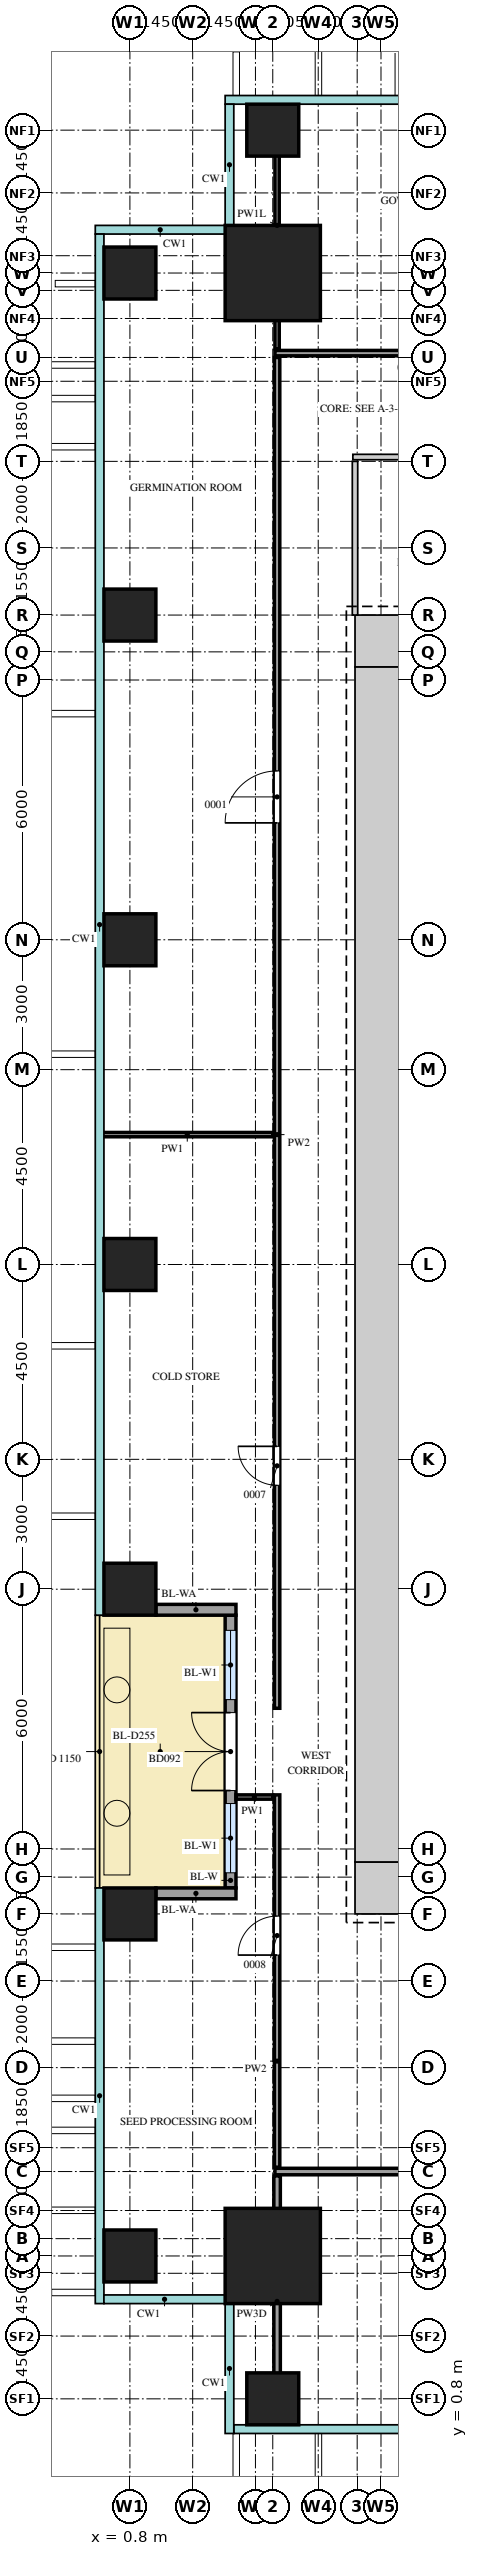
"""IFC4 building model, lengths in metres.
Left out: names, types, materials, properties, quantities, classifications, styles, units other than length and angle.
Written with IfcOpenShell. Run it as: python <this file> out.ifc"""

import sys

from ifc_helpers import new_model, si_unit, direction, frame, frame_2d, origin, origin_2d, place, context, subcontext, project, spatial, rectangle, extrude, source, transform, mapped, element, fill, save


model = new_model("IFC4")
c1 = context("Model", 3, precision=1e-05, world=origin(), true_north=direction((0.0, 1.0)))
c2 = subcontext(c1, "Body", "Model", "MODEL_VIEW")
j1 = project(units=[si_unit("LENGTHUNIT", "METRE"), si_unit("PLANEANGLEUNIT", "RADIAN")], contexts=[c1])
p1 = place(None, origin())
s1 = spatial("IfcSite", under=j1, at=p1, CompositionType="ELEMENT")
p2 = place(p1, origin())
s2 = spatial("IfcBuilding", under=s1, at=p2, CompositionType="ELEMENT")
p3 = place(p2, frame((0.0, 0.0, 46.5)))
s3 = spatial("IfcBuildingStorey", under=s2, at=p3, CompositionType="ELEMENT", Elevation=46.5)
m1 = source(origin(), c2, "Body", "SweptSolid", [
    extrude(rectangle(XDim=1.2, YDim=1.2, at=frame_2d((0.6, 0.0))), origin(), (0.0, 0.0, 1.0), 4.2),
])
for number, where, z_axis, x_axis in (
    (1, (6.0, 41.4, 0.0), (0.0, 0.0, 1.0), (1.0, 0.0, 0.0)),
    (2, (6.0, 12.6, 0.0), (0.0, 0.0, 1.0), (1.0, 0.0, 0.0)),
):
    element("IfcWall", number, at=place(p3, frame(where, z_axis=z_axis, x_axis=x_axis)), inside=s3, PredefinedType="SHEAR", context=c2, shape_type="MappedRepresentation", body=[
        mapped(m1, transform((0.0, 0.0, 0.0))),
    ])
m2 = source(origin(), c2, "Body", "SweptSolid", [
    extrude(rectangle(XDim=27.6, YDim=1.2, at=frame_2d((13.8, 0.0))), origin(), (0.0, 0.0, 1.0), 4.2),
])
p4 = place(p3, frame((6.6, 13.2, 0.0), z_axis=(0.0, 0.0, 1.0), x_axis=(0.0, 1.0, 0.0)))
e3 = element("IfcWall", 3, at=p4, inside=s3, PredefinedType="SHEAR", context=c2, shape_type="MappedRepresentation", body=[
    mapped(m2, transform((0.0, 0.0, 0.0))),
])
m3 = source(origin(), c2, "Body", "SweptSolid", [
    extrude(rectangle(XDim=2.2, YDim=2.2, at=origin_2d()), origin(), (0.0, 0.0, 1.0), 4.5),
])
for number, where, z_axis, x_axis in (
    (4, (4.1, 49.9, 0.0), (0.0, 0.0, 1.0), (1.0, 0.0, 0.0)),
    (5, (4.1, 4.1, 0.0), (0.0, 0.0, 1.0), (1.0, 0.0, 0.0)),
):
    element("IfcColumn", number, at=place(p3, frame(where, z_axis=z_axis, x_axis=x_axis)), inside=s3, PredefinedType="COLUMN", context=c2, shape_type="MappedRepresentation", body=[
        mapped(m3, transform((0.0, 0.0, 0.0))),
    ])
m4 = source(origin(), c2, "Body", "SweptSolid", [
    extrude(rectangle(XDim=1.2, YDim=1.2, at=origin_2d()), origin(), (0.0, 0.0, 1.0), 4.2),
])
for number, where, z_axis, x_axis in (
    (6, (4.1, 0.8, 0.0), (0.0, 0.0, 1.0), (1.0, 0.0, 0.0)),
    (7, (4.1, 53.2, 0.0), (0.0, 0.0, 1.0), (1.0, 0.0, 0.0)),
    (8, (0.8, 4.1, 0.0), (0.0, 0.0, 1.0), (1.0, 0.0, 0.0)),
    (9, (0.8, 12.0, 0.0), (0.0, 0.0, 1.0), (1.0, 0.0, 0.0)),
    (10, (0.8, 19.5, 0.0), (0.0, 0.0, 1.0), (1.0, 0.0, 0.0)),
    (11, (0.8, 27.0, 0.0), (0.0, 0.0, 1.0), (1.0, 0.0, 0.0)),
    (12, (0.8, 34.5, 0.0), (0.0, 0.0, 1.0), (1.0, 0.0, 0.0)),
    (13, (0.8, 42.0, 0.0), (0.0, 0.0, 1.0), (1.0, 0.0, 0.0)),
    (14, (0.8, 49.9, 0.0), (0.0, 0.0, 1.0), (1.0, 0.0, 0.0)),
):
    element("IfcColumn", number, at=place(p3, frame(where, z_axis=z_axis, x_axis=x_axis)), inside=s3, PredefinedType="COLUMN", context=c2, shape_type="MappedRepresentation", body=[
        mapped(m4, transform((0.0, 0.0, 0.0))),
    ])
m5 = source(origin(), c2, "Body", "SweptSolid", [
    extrude(rectangle(XDim=6.3, YDim=0.25, at=frame_2d((3.15, 0.0))), origin(), (0.0, 0.0, 1.0), 4.2),
])
p5 = place(p3, frame((3.125, 12.6, 0.0), z_axis=(0.0, 0.0, 1.0), x_axis=(0.0, 1.0, 0.0)))
e15 = element("IfcWall", 15, at=p5, inside=s3, PredefinedType="SOLIDWALL", context=c2, shape_type="MappedRepresentation", body=[
    mapped(m5, transform((0.0, 0.0, 0.0))),
])
m6 = source(origin(), c2, "Body", "SweptSolid", [
    extrude(rectangle(XDim=1.6, YDim=2.4, at=frame_2d((0.8, 1.2))), frame((0.0, 0.135, 0.0), z_axis=(0.0, -1.0, 0.0), x_axis=(1.0, 0.0, 0.0)), (0.0, 0.0, 1.0), 0.27),
])
p6 = place(p5, frame((0.35, 0.0, 0.0)))
e16 = element("IfcOpeningElement", 16, at=p6, cuts=e15, PredefinedType="OPENING", context=c2, shape_type="MappedRepresentation", body=[
    mapped(m6, transform((0.0, 0.0, 0.0))),
])
p7 = place(p5, frame((4.35, 0.0, 0.0)))
e17 = element("IfcOpeningElement", 17, at=p7, cuts=e15, PredefinedType="OPENING", context=c2, shape_type="MappedRepresentation", body=[
    mapped(m6, transform((0.0, 0.0, 0.0))),
])
m7 = source(origin(), c2, "Body", "SweptSolid", [
    extrude(rectangle(XDim=1.8, YDim=2.4, at=frame_2d((0.9, 1.2))), frame((0.0, 0.135, 0.0), z_axis=(0.0, -1.0, 0.0), x_axis=(1.0, 0.0, 0.0)), (0.0, 0.0, 1.0), 0.27),
])
p8 = place(p5, frame((2.25, 0.0, 0.0)))
e18 = element("IfcOpeningElement", 18, at=p8, cuts=e15, PredefinedType="OPENING", context=c2, shape_type="MappedRepresentation", body=[
    mapped(m7, transform((0.0, 0.0, 0.0))),
])
m8 = source(origin(), c2, "Body", "SweptSolid", [
    extrude(rectangle(XDim=1.85, YDim=0.25, at=frame_2d((0.925, 0.0))), origin(), (0.0, 0.0, 1.0), 3.9),
])
for number, where, z_axis, x_axis in (
    (19, (1.4, 12.475, 0.0), (0.0, 0.0, 1.0), (1.0, 0.0, 0.0)),
    (20, (1.4, 19.025, 0.0), (0.0, 0.0, 1.0), (1.0, 0.0, 0.0)),
):
    element("IfcWall", number, at=place(p3, frame(where, z_axis=z_axis, x_axis=x_axis)), inside=s3, PredefinedType="SOLIDWALL", context=c2, shape_type="MappedRepresentation", body=[
        mapped(m8, transform((0.0, 0.0, 0.0))),
    ])
m9 = source(origin(), c2, "Body", "SweptSolid", [
    extrude(rectangle(XDim=5.8, YDim=0.15, at=frame_2d((2.9, 0.0))), origin(), (0.0, 0.0, 1.0), 3.6),
])
p9 = place(p3, frame((4.2, 0.15, 0.0), z_axis=(0.0, 0.0, 1.0), x_axis=(0.0, 1.0, 0.0)))
e21 = element("IfcWall", 21, at=p9, inside=s3, PredefinedType="PARTITIONING", context=c2, shape_type="MappedRepresentation", body=[
    mapped(m9, transform((0.0, 0.0, 0.0))),
])
m10 = source(origin(), c2, "Body", "SweptSolid", [
    extrude(rectangle(XDim=22.15, YDim=0.15, at=frame_2d((11.075, 0.0))), origin(), (0.0, 0.0, 1.0), 4.3),
])
p10 = place(p3, frame((4.15, 6.05, 0.0), z_axis=(0.0, 0.0, 1.0), x_axis=(1.0, 0.0, 0.0)))
e22 = element("IfcWall", 22, at=p10, inside=s3, PredefinedType="PARTITIONING", context=c2, shape_type="MappedRepresentation", body=[
    mapped(m10, transform((0.0, 0.0, 0.0))),
])
m11 = source(origin(), c2, "Body", "SweptSolid", [
    extrude(rectangle(XDim=1.2, YDim=2.1, at=frame_2d((0.6, 1.05))), frame((0.0, 0.085, 0.0), z_axis=(0.0, -1.0, 0.0), x_axis=(1.0, 0.0, 0.0)), (0.0, 0.0, 1.0), 0.17),
])
p11 = place(p10, frame((9.2, 0.0, 0.0)))
e23 = element("IfcOpeningElement", 23, at=p11, cuts=e22, PredefinedType="OPENING", context=c2, shape_type="MappedRepresentation", body=[
    mapped(m11, transform((0.0, 0.0, 0.0))),
])
m12 = source(origin(), c2, "Body", "SweptSolid", [
    extrude(rectangle(XDim=0.85, YDim=0.1, at=frame_2d((0.425, 0.0))), origin(), (0.0, 0.0, 1.0), 4.3),
])
p12 = place(p3, frame((3.25, 14.7, 0.0), z_axis=(0.0, 0.0, 1.0), x_axis=(1.0, 0.0, 0.0)))
e24 = element("IfcWall", 24, at=p12, inside=s3, PredefinedType="PARTITIONING", context=c2, shape_type="MappedRepresentation", body=[
    mapped(m12, transform((0.0, 0.0, 0.0))),
])
m13 = source(origin(), c2, "Body", "SweptSolid", [
    extrude(rectangle(XDim=3.95, YDim=0.1, at=frame_2d((1.975, 0.0))), origin(), (0.0, 0.0, 1.0), 4.3),
])
p13 = place(p3, frame((0.15, 30.0, 0.0), z_axis=(0.0, 0.0, 1.0), x_axis=(1.0, 0.0, 0.0)))
e25 = element("IfcWall", 25, at=p13, inside=s3, PredefinedType="PARTITIONING", context=c2, shape_type="MappedRepresentation", body=[
    mapped(m13, transform((0.0, 0.0, 0.0))),
])
m14 = source(origin(), c2, "Body", "SweptSolid", [
    extrude(rectangle(XDim=3.55, YDim=0.125, at=frame_2d((1.775, 0.0))), origin(), (0.0, 0.0, 1.0), 4.3),
])
p14 = place(p3, frame((6.0, 42.0, 0.0), z_axis=(0.0, 0.0, 1.0), x_axis=(0.0, 1.0, 0.0)))
e26 = element("IfcWall", 26, at=p14, inside=s3, PredefinedType="PARTITIONING", context=c2, shape_type="MappedRepresentation", body=[
    mapped(m14, transform((0.0, 0.0, 0.0))),
])
m15 = source(origin(), c2, "Body", "SweptSolid", [
    extrude(rectangle(XDim=7.95, YDim=0.125, at=frame_2d((3.975, 0.0))), origin(), (0.0, 0.0, 1.0), 4.3),
])
p15 = place(p3, frame((5.95, 45.65, 0.0), z_axis=(0.0, 0.0, 1.0), x_axis=(1.0, 0.0, 0.0)))
e27 = element("IfcWall", 27, at=p15, inside=s3, PredefinedType="PARTITIONING", context=c2, shape_type="MappedRepresentation", body=[
    mapped(m15, transform((0.0, 0.0, 0.0))),
])
m16 = source(origin(), c2, "Body", "SweptSolid", [
    extrude(rectangle(XDim=0.9, YDim=2.1, at=frame_2d((0.45, 1.05))), frame((0.0, 0.073, 0.0), z_axis=(0.0, -1.0, 0.0), x_axis=(1.0, 0.0, 0.0)), (0.0, 0.0, 1.0), 0.145),
])
p16 = place(p15, frame((1.55, 0.0, 0.0)))
e28 = element("IfcOpeningElement", 28, at=p16, cuts=e27, PredefinedType="OPENING", context=c2, shape_type="MappedRepresentation", body=[
    mapped(m16, transform((0.0, 0.0, 0.0))),
])
p17 = place(p15, frame((5.65, 0.0, 0.0)))
e29 = element("IfcOpeningElement", 29, at=p17, cuts=e27, PredefinedType="OPENING", context=c2, shape_type="MappedRepresentation", body=[
    mapped(m16, transform((0.0, 0.0, 0.0))),
])
m17 = source(origin(), c2, "Body", "SweptSolid", [
    extrude(rectangle(XDim=26.6, YDim=0.125, at=frame_2d((13.3, 0.0))), origin(), (0.0, 0.0, 1.0), 4.3),
])
p18 = place(p3, frame((4.15, 48.05, 0.0), z_axis=(0.0, 0.0, 1.0), x_axis=(1.0, 0.0, 0.0)))
e30 = element("IfcWall", 30, at=p18, inside=s3, PredefinedType="PARTITIONING", context=c2, shape_type="MappedRepresentation", body=[
    mapped(m17, transform((0.0, 0.0, 0.0))),
])
p19 = place(p18, frame((3.5, 0.0, 0.0)))
e31 = element("IfcOpeningElement", 31, at=p19, cuts=e30, PredefinedType="OPENING", context=c2, shape_type="MappedRepresentation", body=[
    mapped(m16, transform((0.0, 0.0, 0.0))),
])
m18 = source(origin(), c2, "Body", "SweptSolid", [
    extrude(rectangle(XDim=1.2, YDim=2.1, at=frame_2d((0.6, 1.05))), frame((0.0, 0.073, 0.0), z_axis=(0.0, -1.0, 0.0), x_axis=(1.0, 0.0, 0.0)), (0.0, 0.0, 1.0), 0.145),
])
p20 = place(p18, frame((16.6, 0.0, 0.0)))
e32 = element("IfcOpeningElement", 32, at=p20, cuts=e30, PredefinedType="OPENING", context=c2, shape_type="MappedRepresentation", body=[
    mapped(m18, transform((0.0, 0.0, 0.0))),
])
m19 = source(origin(), c2, "Body", "SweptSolid", [
    extrude(rectangle(XDim=5.7, YDim=0.1, at=frame_2d((2.85, 0.0))), origin(), (0.0, 0.0, 1.0), 3.6),
])
p21 = place(p3, frame((4.2, 48.15, 0.0), z_axis=(0.0, 0.0, 1.0), x_axis=(0.0, 1.0, 0.0)))
e33 = element("IfcWall", 33, at=p21, inside=s3, PredefinedType="PARTITIONING", context=c2, shape_type="MappedRepresentation", body=[
    mapped(m19, transform((0.0, 0.0, 0.0))),
])
m20 = source(origin(), c2, "Body", "SweptSolid", [
    extrude(rectangle(XDim=8.6, YDim=0.125, at=frame_2d((4.3, 0.0))), origin(), (0.0, 0.0, 1.0), 4.3),
])
p22 = place(p3, frame((4.2, 6.15, 0.0), z_axis=(0.0, 0.0, 1.0), x_axis=(0.0, 1.0, 0.0)))
e34 = element("IfcWall", 34, at=p22, inside=s3, PredefinedType="PARTITIONING", context=c2, shape_type="MappedRepresentation", body=[
    mapped(m20, transform((0.0, 0.0, 0.0))),
])
p23 = place(p22, frame((4.9, 0.0, 0.0)))
e35 = element("IfcOpeningElement", 35, at=p23, cuts=e34, PredefinedType="OPENING", context=c2, shape_type="MappedRepresentation", body=[
    mapped(m16, transform((0.0, 0.0, 0.0))),
])
m21 = source(origin(), c2, "Body", "SweptSolid", [
    extrude(rectangle(XDim=31.2, YDim=0.125, at=frame_2d((15.6, 0.0))), origin(), (0.0, 0.0, 1.0), 4.3),
])
p24 = place(p3, frame((4.2, 16.75, 0.0), z_axis=(0.0, 0.0, 1.0), x_axis=(0.0, 1.0, 0.0)))
e36 = element("IfcWall", 36, at=p24, inside=s3, PredefinedType="PARTITIONING", context=c2, shape_type="MappedRepresentation", body=[
    mapped(m21, transform((0.0, 0.0, 0.0))),
])
p25 = place(p24, frame((5.15, 0.0, 0.0)))
e37 = element("IfcOpeningElement", 37, at=p25, cuts=e36, PredefinedType="OPENING", context=c2, shape_type="MappedRepresentation", body=[
    mapped(m16, transform((0.0, 0.0, 0.0))),
])
p26 = place(p24, frame((20.45, 0.0, 0.0)))
e38 = element("IfcOpeningElement", 38, at=p26, cuts=e36, PredefinedType="OPENING", context=c2, shape_type="MappedRepresentation", body=[
    mapped(m18, transform((0.0, 0.0, 0.0))),
])
m22 = source(origin(), c2, "Body", "SweptSolid", [
    extrude(rectangle(XDim=1.6, YDim=2.4, at=frame_2d((0.8, 1.2))), frame((0.0, 0.03, 0.0), z_axis=(0.0, -1.0, 0.0), x_axis=(1.0, 0.0, 0.0)), (0.0, 0.0, 1.0), 0.06),
])
p27 = place(p6, origin())
e39 = element("IfcWindow", 39, at=p27, inside=s3, PartitioningType="SINGLE_PANEL", PredefinedType="WINDOW", context=c2, shape_type="MappedRepresentation", body=[
    mapped(m22, transform((0.0, 0.0, 0.0))),
])
fill(e16, e39)
p28 = place(p7, origin())
e40 = element("IfcWindow", 40, at=p28, inside=s3, PartitioningType="SINGLE_PANEL", PredefinedType="WINDOW", context=c2, shape_type="MappedRepresentation", body=[
    mapped(m22, transform((0.0, 0.0, 0.0))),
])
fill(e17, e40)
m23 = source(origin(), c2, "Body", "SweptSolid", [
    extrude(rectangle(XDim=1.8, YDim=2.4, at=frame_2d((0.9, 1.2))), frame((0.0, 0.025, 0.0), z_axis=(0.0, -1.0, 0.0), x_axis=(1.0, 0.0, 0.0)), (0.0, 0.0, 1.0), 0.05),
])
p29 = place(p8, origin())
e41 = element("IfcDoor", 41, at=p29, inside=s3, OperationType="DOUBLE_DOOR_DOUBLE_SWING", PredefinedType="DOOR", context=c2, shape_type="MappedRepresentation", body=[
    mapped(m23, transform((0.0, 0.0, 0.0))),
])
fill(e18, e41)
m24 = source(origin(), c2, "Body", "SweptSolid", [
    extrude(rectangle(XDim=0.9, YDim=2.1, at=frame_2d((0.45, 1.05))), frame((0.0, 0.025, 0.0), z_axis=(0.0, -1.0, 0.0), x_axis=(1.0, 0.0, 0.0)), (0.0, 0.0, 1.0), 0.05),
])
p30 = place(p23, origin())
e42 = element("IfcDoor", 42, at=p30, inside=s3, OperationType="SINGLE_SWING_RIGHT", PredefinedType="DOOR", context=c2, shape_type="MappedRepresentation", body=[
    mapped(m24, transform((0.0, 0.0, 0.0))),
])
fill(e35, e42)
p31 = place(p25, origin())
e43 = element("IfcDoor", 43, at=p31, inside=s3, OperationType="SINGLE_SWING_LEFT", PredefinedType="DOOR", context=c2, shape_type="MappedRepresentation", body=[
    mapped(m24, transform((0.0, 0.0, 0.0))),
])
fill(e37, e43)
m25 = source(origin(), c2, "Body", "SweptSolid", [
    extrude(rectangle(XDim=1.2, YDim=2.1, at=frame_2d((0.6, 1.05))), frame((0.0, 0.025, 0.0), z_axis=(0.0, -1.0, 0.0), x_axis=(1.0, 0.0, 0.0)), (0.0, 0.0, 1.0), 0.05),
])
p32 = place(p26, origin())
e44 = element("IfcDoor", 44, at=p32, inside=s3, OperationType="SINGLE_SWING_RIGHT", PredefinedType="DOOR", context=c2, shape_type="MappedRepresentation", body=[
    mapped(m25, transform((0.0, 0.0, 0.0))),
])
fill(e38, e44)
save(model, sys.argv[1])
